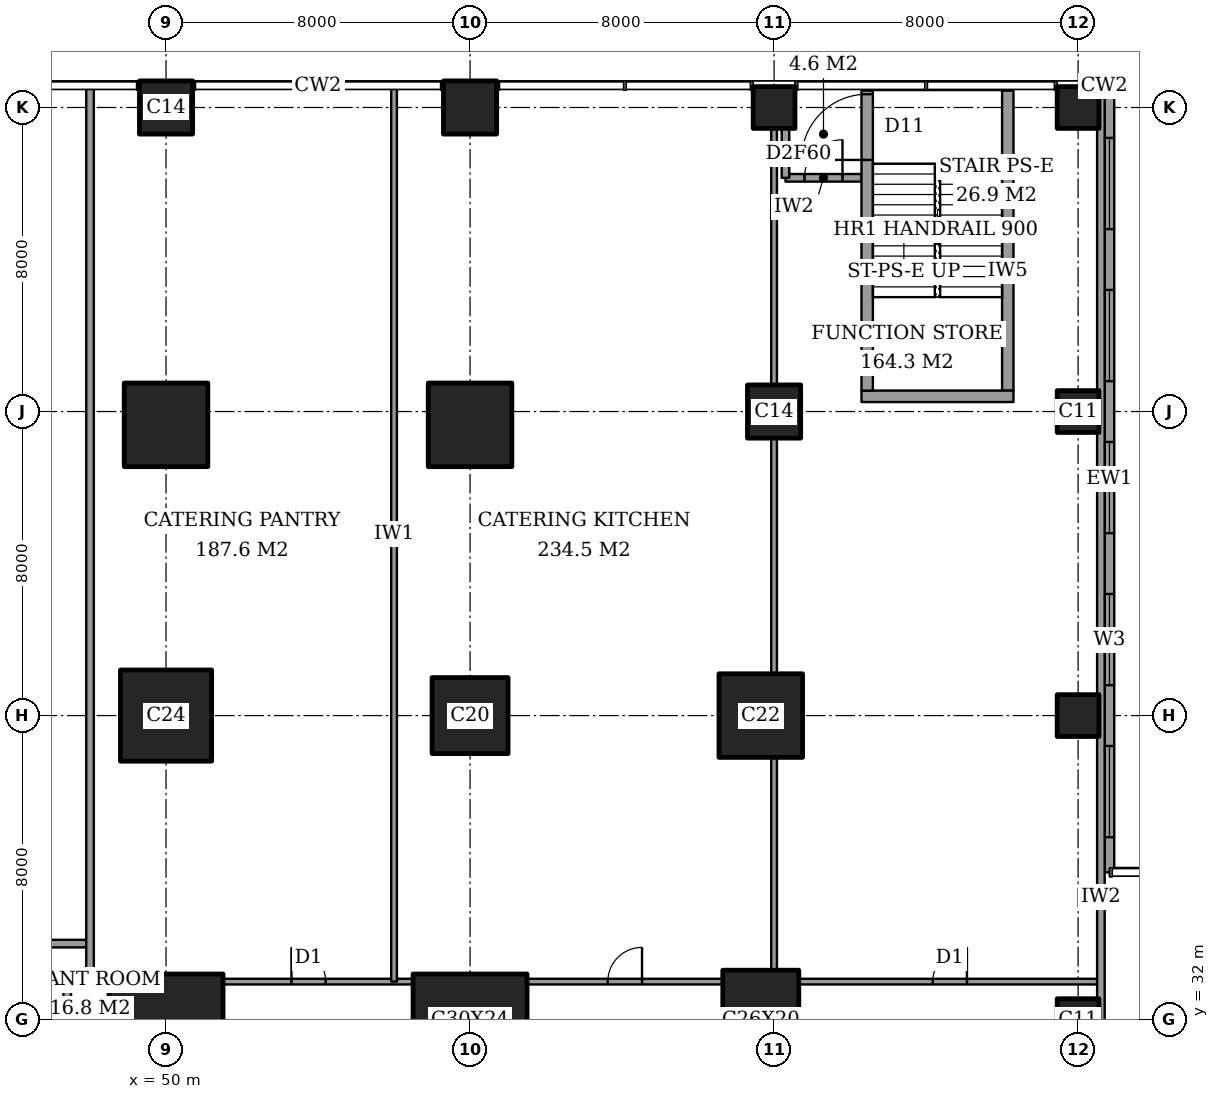
"""IFC4 building model, lengths in metres.
Left out: names, types, materials, properties, quantities, classifications, styles, units other than length and angle.
Written with IfcOpenShell. Run it as: python <this file> out.ifc"""

import sys

from ifc_helpers import new_model, si_unit, direction, frame, frame_2d, origin, origin_2d, place, context, subcontext, project, spatial, rectangle, extrude, element, fill, save


model = new_model("IFC4")
c1 = context("Model", 3, precision=1e-05, world=origin(), true_north=direction((0.0, 1.0)))
c2 = subcontext(c1, "Body", "Model", "MODEL_VIEW")
j1 = project(units=[si_unit("LENGTHUNIT", "METRE"), si_unit("PLANEANGLEUNIT", "RADIAN")], contexts=[c1])
p1 = place(None, origin())
s1 = spatial("IfcSite", under=j1, at=p1, CompositionType="ELEMENT")
p2 = place(p1, origin())
s2 = spatial("IfcBuilding", under=s1, at=p2, CompositionType="ELEMENT")
p3 = place(p2, frame((0.0, 0.0, 6.0)))
s3 = spatial("IfcBuildingStorey", under=s2, at=p3, CompositionType="ELEMENT", Elevation=6.0)
p4 = place(p3, frame((50.0, 32.0, 0.0), z_axis=(0.0, 0.0, 1.0), x_axis=(1.0, 0.0, 0.0)))
e1 = element("IfcColumn", 1, at=p4, inside=s3, PredefinedType="COLUMN", context=c2, shape_type="SweptSolid", body=[
    extrude(rectangle(XDim=3.0, YDim=2.4, at=origin_2d()), origin(), (0.0, 0.0, 1.0), 5.0),
])
p5 = place(p3, frame((50.0, 40.0, 0.0), z_axis=(0.0, 0.0, 1.0), x_axis=(1.0, 0.0, 0.0)))
e2 = element("IfcColumn", 2, at=p5, inside=s3, PredefinedType="COLUMN", context=c2, shape_type="SweptSolid", body=[
    extrude(rectangle(XDim=2.4, YDim=2.4, at=origin_2d()), origin(), (0.0, 0.0, 1.0), 5.0),
])
p6 = place(p3, frame((50.0, 47.65, 0.0), z_axis=(0.0, 0.0, 1.0), x_axis=(1.0, 0.0, 0.0)))
e3 = element("IfcColumn", 3, at=p6, inside=s3, PredefinedType="COLUMN", context=c2, shape_type="SweptSolid", body=[
    extrude(rectangle(XDim=2.2, YDim=2.2, at=origin_2d()), origin(), (0.0, 0.0, 1.0), 5.0),
])
p7 = place(p3, frame((50.0, 56.0, 0.0), z_axis=(0.0, 0.0, 1.0), x_axis=(1.0, 0.0, 0.0)))
e4 = element("IfcColumn", 4, at=p7, inside=s3, PredefinedType="COLUMN", context=c2, shape_type="SweptSolid", body=[
    extrude(rectangle(XDim=1.4, YDim=1.4, at=origin_2d()), origin(), (0.0, 0.0, 1.0), 5.0),
])
p8 = place(p3, frame((58.0, 32.0, 0.0), z_axis=(0.0, 0.0, 1.0), x_axis=(1.0, 0.0, 0.0)))
e5 = element("IfcColumn", 5, at=p8, inside=s3, PredefinedType="COLUMN", context=c2, shape_type="SweptSolid", body=[
    extrude(rectangle(XDim=3.0, YDim=2.4, at=origin_2d()), origin(), (0.0, 0.0, 1.0), 5.0),
])
p9 = place(p3, frame((58.0, 40.0, 0.0), z_axis=(0.0, 0.0, 1.0), x_axis=(1.0, 0.0, 0.0)))
e6 = element("IfcColumn", 6, at=p9, inside=s3, PredefinedType="COLUMN", context=c2, shape_type="SweptSolid", body=[
    extrude(rectangle(XDim=2.0, YDim=2.0, at=origin_2d()), origin(), (0.0, 0.0, 1.0), 5.0),
])
p10 = place(p3, frame((58.0, 47.65, 0.0), z_axis=(0.0, 0.0, 1.0), x_axis=(1.0, 0.0, 0.0)))
e7 = element("IfcColumn", 7, at=p10, inside=s3, PredefinedType="COLUMN", context=c2, shape_type="SweptSolid", body=[
    extrude(rectangle(XDim=2.2, YDim=2.2, at=origin_2d()), origin(), (0.0, 0.0, 1.0), 5.0),
])
p11 = place(p3, frame((58.0, 56.0, 0.0), z_axis=(0.0, 0.0, 1.0), x_axis=(1.0, 0.0, 0.0)))
e8 = element("IfcColumn", 8, at=p11, inside=s3, PredefinedType="COLUMN", context=c2, shape_type="SweptSolid", body=[
    extrude(rectangle(XDim=1.4, YDim=1.4, at=origin_2d()), origin(), (0.0, 0.0, 1.0), 5.0),
])
p12 = place(p3, frame((65.65, 32.0, 0.0), z_axis=(0.0, 0.0, 1.0), x_axis=(0.0, 1.0, 0.0)))
e9 = element("IfcColumn", 9, at=p12, inside=s3, PredefinedType="COLUMN", context=c2, shape_type="SweptSolid", body=[
    extrude(rectangle(XDim=2.6, YDim=2.0, at=origin_2d()), origin(), (0.0, 0.0, 1.0), 5.0),
])
p13 = place(p3, frame((65.65, 40.0, 0.0), z_axis=(0.0, 0.0, 1.0), x_axis=(1.0, 0.0, 0.0)))
e10 = element("IfcColumn", 10, at=p13, inside=s3, PredefinedType="COLUMN", context=c2, shape_type="SweptSolid", body=[
    extrude(rectangle(XDim=2.2, YDim=2.2, at=origin_2d()), origin(), (0.0, 0.0, 1.0), 5.0),
])
p14 = place(p3, frame((66.0, 48.0, 0.0), z_axis=(0.0, 0.0, 1.0), x_axis=(1.0, 0.0, 0.0)))
e11 = element("IfcColumn", 11, at=p14, inside=s3, PredefinedType="COLUMN", context=c2, shape_type="SweptSolid", body=[
    extrude(rectangle(XDim=1.4, YDim=1.4, at=origin_2d()), origin(), (0.0, 0.0, 1.0), 5.0),
])
for number, where, z_axis, x_axis in (
    (12, (66.0, 56.0, 0.0), (0.0, 0.0, 1.0), (1.0, 0.0, 0.0)),
    (13, (74.0, 32.0, 0.0), (0.0, 0.0, 1.0), (1.0, 0.0, 0.0)),
    (14, (74.0, 40.0, 0.0), (0.0, 0.0, 1.0), (1.0, 0.0, 0.0)),
    (15, (74.0, 48.0, 0.0), (0.0, 0.0, 1.0), (1.0, 0.0, 0.0)),
    (16, (74.0, 56.0, 0.0), (0.0, 0.0, 1.0), (1.0, 0.0, 0.0)),
):
    element("IfcColumn", number, at=place(p3, frame(where, z_axis=z_axis, x_axis=x_axis)), inside=s3, PredefinedType="COLUMN", context=c2, shape_type="SweptSolid", body=[
        extrude(rectangle(XDim=1.1, YDim=1.1, at=origin_2d()), origin(), (0.0, 0.0, 1.0), 5.0),
    ])
p15 = place(p3, frame((74.825, 35.875, 0.0), z_axis=(0.0, 0.0, 1.0), x_axis=(0.0, 1.0, 0.0)))
e17 = element("IfcWall", 17, at=p15, inside=s3, PredefinedType="SOLIDWALL", context=c2, shape_type="SweptSolid", body=[
    extrude(rectangle(XDim=20.7, YDim=0.25, at=frame_2d((10.35, 0.0))), origin(), (0.0, 0.0, 1.0), 5.0),
])
p16 = place(p15, frame((4.925, 0.0, 0.6)))
e18 = element("IfcOpeningElement", 18, at=p16, cuts=e17, PredefinedType="OPENING", context=c2, shape_type="SweptSolid", body=[
    extrude(rectangle(XDim=2.4, YDim=3.0, at=frame_2d((1.2, 1.5))), frame((0.0, 0.135, 0.0), z_axis=(0.0, -1.0, 0.0), x_axis=(1.0, 0.0, 0.0)), (0.0, 0.0, 1.0), 0.27),
])
p17 = place(p15, frame((8.925, 0.0, 0.6)))
e19 = element("IfcOpeningElement", 19, at=p17, cuts=e17, PredefinedType="OPENING", context=c2, shape_type="SweptSolid", body=[
    extrude(rectangle(XDim=2.4, YDim=3.0, at=frame_2d((1.2, 1.5))), frame((0.0, 0.135, 0.0), z_axis=(0.0, -1.0, 0.0), x_axis=(1.0, 0.0, 0.0)), (0.0, 0.0, 1.0), 0.27),
])
p18 = place(p15, frame((12.925, 0.0, 0.6)))
e20 = element("IfcOpeningElement", 20, at=p18, cuts=e17, PredefinedType="OPENING", context=c2, shape_type="SweptSolid", body=[
    extrude(rectangle(XDim=2.4, YDim=3.0, at=frame_2d((1.2, 1.5))), frame((0.0, 0.135, 0.0), z_axis=(0.0, -1.0, 0.0), x_axis=(1.0, 0.0, 0.0)), (0.0, 0.0, 1.0), 0.27),
])
p19 = place(p15, frame((16.925, 0.0, 0.6)))
e21 = element("IfcOpeningElement", 21, at=p19, cuts=e17, PredefinedType="OPENING", context=c2, shape_type="SweptSolid", body=[
    extrude(rectangle(XDim=2.4, YDim=3.0, at=frame_2d((1.2, 1.5))), frame((0.0, 0.135, 0.0), z_axis=(0.0, -1.0, 0.0), x_axis=(1.0, 0.0, 0.0)), (0.0, 0.0, 1.0), 0.27),
])
p20 = place(p15, frame((0.925, 0.0, 0.6)))
e22 = element("IfcOpeningElement", 22, at=p20, cuts=e17, PredefinedType="OPENING", context=c2, shape_type="SweptSolid", body=[
    extrude(rectangle(XDim=2.4, YDim=3.0, at=frame_2d((1.2, 1.5))), frame((0.0, 0.135, 0.0), z_axis=(0.0, -1.0, 0.0), x_axis=(1.0, 0.0, 0.0)), (0.0, 0.0, 1.0), 0.27),
])
p21 = place(p3, frame((47.4, 33.0, 0.0), z_axis=(0.0, 0.0, 1.0), x_axis=(1.0, 0.0, 0.0)))
e23 = element("IfcWall", 23, at=p21, inside=s3, PredefinedType="PARTITIONING", context=c2, shape_type="SweptSolid", body=[
    extrude(rectangle(XDim=0.6, YDim=0.2, at=frame_2d((0.3, 0.0))), origin(), (0.0, 0.0, 1.0), 4.7),
])
p22 = place(p3, frame((48.0, 33.0, 0.0), z_axis=(0.0, 0.0, 1.0), x_axis=(1.0, 0.0, 0.0)))
e24 = element("IfcWall", 24, at=p22, inside=s3, PredefinedType="PARTITIONING", context=c2, shape_type="SweptSolid", body=[
    extrude(rectangle(XDim=0.5, YDim=0.15, at=frame_2d((0.25, 0.0))), origin(), (0.0, 0.0, 1.0), 4.7),
])
p23 = place(p3, frame((51.5, 33.0, 0.0), z_axis=(0.0, 0.0, 1.0), x_axis=(1.0, 0.0, 0.0)))
e25 = element("IfcWall", 25, at=p23, inside=s3, PredefinedType="PARTITIONING", context=c2, shape_type="SweptSolid", body=[
    extrude(rectangle(XDim=5.0, YDim=0.15, at=frame_2d((2.5, 0.0))), origin(), (0.0, 0.0, 1.0), 4.7),
])
p24 = place(p23, frame((1.8, 0.0, 0.0)))
e26 = element("IfcOpeningElement", 26, at=p24, cuts=e25, PredefinedType="OPENING", context=c2, shape_type="SweptSolid", body=[
    extrude(rectangle(XDim=0.9, YDim=2.1, at=frame_2d((0.45, 1.05))), frame((0.0, 0.085, 0.0), z_axis=(0.0, -1.0, 0.0), x_axis=(1.0, 0.0, 0.0)), (0.0, 0.0, 1.0), 0.17),
])
p25 = place(p3, frame((59.5, 33.0, 0.0), z_axis=(0.0, 0.0, 1.0), x_axis=(1.0, 0.0, 0.0)))
e27 = element("IfcWall", 27, at=p25, inside=s3, PredefinedType="PARTITIONING", context=c2, shape_type="SweptSolid", body=[
    extrude(rectangle(XDim=5.15, YDim=0.15, at=frame_2d((2.575, 0.0))), origin(), (0.0, 0.0, 1.0), 4.7),
])
p26 = place(p25, frame((2.125, 0.0, 0.0)))
e28 = element("IfcOpeningElement", 28, at=p26, cuts=e27, PredefinedType="OPENING", context=c2, shape_type="SweptSolid", body=[
    extrude(rectangle(XDim=0.9, YDim=2.1, at=frame_2d((0.45, 1.05))), frame((0.0, 0.085, 0.0), z_axis=(0.0, -1.0, 0.0), x_axis=(1.0, 0.0, 0.0)), (0.0, 0.0, 1.0), 0.17),
])
p27 = place(p3, frame((66.65, 33.0, 0.0), z_axis=(0.0, 0.0, 1.0), x_axis=(1.0, 0.0, 0.0)))
e29 = element("IfcWall", 29, at=p27, inside=s3, PredefinedType="PARTITIONING", context=c2, shape_type="SweptSolid", body=[
    extrude(rectangle(XDim=7.95, YDim=0.15, at=frame_2d((3.975, 0.0))), origin(), (0.0, 0.0, 1.0), 4.7),
])
p28 = place(p27, frame((3.525, 0.0, 0.0)))
e30 = element("IfcOpeningElement", 30, at=p28, cuts=e29, PredefinedType="OPENING", context=c2, shape_type="SweptSolid", body=[
    extrude(rectangle(XDim=0.9, YDim=2.1, at=frame_2d((0.45, 1.05))), frame((0.0, 0.085, 0.0), z_axis=(0.0, -1.0, 0.0), x_axis=(1.0, 0.0, 0.0)), (0.0, 0.0, 1.0), 0.17),
])
p29 = place(p3, frame((42.0, 34.0, 0.0), z_axis=(0.0, 0.0, 1.0), x_axis=(1.0, 0.0, 0.0)))
e31 = element("IfcWall", 31, at=p29, inside=s3, PredefinedType="PARTITIONING", context=c2, shape_type="SweptSolid", body=[
    extrude(rectangle(XDim=6.0, YDim=0.2, at=frame_2d((3.0, 0.0))), origin(), (0.0, 0.0, 1.0), 4.7),
])
p30 = place(p3, frame((66.3, 54.15, 0.0), z_axis=(0.0, 0.0, 1.0), x_axis=(1.0, 0.0, 0.0)))
e32 = element("IfcWall", 32, at=p30, inside=s3, PredefinedType="PARTITIONING", context=c2, shape_type="SweptSolid", body=[
    extrude(rectangle(XDim=2.0, YDim=0.2, at=frame_2d((1.0, 0.0))), origin(), (0.0, 0.0, 1.0), 4.7),
])
p31 = place(p30, frame((0.5, 0.0, 0.0)))
e33 = element("IfcOpeningElement", 33, at=p31, cuts=e32, PredefinedType="OPENING", context=c2, shape_type="SweptSolid", body=[
    extrude(rectangle(XDim=1.0, YDim=2.1, at=frame_2d((0.5, 1.05))), frame((0.0, 0.11, 0.0), z_axis=(0.0, -1.0, 0.0), x_axis=(1.0, 0.0, 0.0)), (0.0, 0.0, 1.0), 0.22),
])
p32 = place(p3, frame((47.4, 29.4, 0.0), z_axis=(0.0, 0.0, 1.0), x_axis=(0.0, 1.0, 0.0)))
e34 = element("IfcWall", 34, at=p32, inside=s3, PredefinedType="PARTITIONING", context=c2, shape_type="SweptSolid", body=[
    extrude(rectangle(XDim=3.6, YDim=0.2, at=frame_2d((1.8, 0.0))), origin(), (0.0, 0.0, 1.0), 4.7),
])
p33 = place(p3, frame((48.0, 33.0, 0.0), z_axis=(0.0, 0.0, 1.0), x_axis=(0.0, 1.0, 0.0)))
e35 = element("IfcWall", 35, at=p33, inside=s3, PredefinedType="PARTITIONING", context=c2, shape_type="SweptSolid", body=[
    extrude(rectangle(XDim=23.561, YDim=0.2, at=frame_2d((11.781, 0.0))), origin(), (0.0, 0.0, 1.0), 4.7),
])
p34 = place(p3, frame((56.0, 33.0, 0.0), z_axis=(0.0, 0.0, 1.0), x_axis=(0.0, 1.0, 0.0)))
e36 = element("IfcWall", 36, at=p34, inside=s3, PredefinedType="PARTITIONING", context=c2, shape_type="SweptSolid", body=[
    extrude(rectangle(XDim=23.561, YDim=0.15, at=frame_2d((11.781, 0.0))), origin(), (0.0, 0.0, 1.0), 4.7),
])
p35 = place(p3, frame((66.0, 33.0, 0.0), z_axis=(0.0, 0.0, 1.0), x_axis=(0.0, 1.0, 0.0)))
e37 = element("IfcWall", 37, at=p35, inside=s3, PredefinedType="PARTITIONING", context=c2, shape_type="SweptSolid", body=[
    extrude(rectangle(XDim=5.9, YDim=0.15, at=frame_2d((2.95, 0.0))), origin(), (0.0, 0.0, 1.0), 3.3),
])
p36 = place(p3, frame((66.0, 41.1, 0.0), z_axis=(0.0, 0.0, 1.0), x_axis=(0.0, 1.0, 0.0)))
e38 = element("IfcWall", 38, at=p36, inside=s3, PredefinedType="PARTITIONING", context=c2, shape_type="SweptSolid", body=[
    extrude(rectangle(XDim=6.2, YDim=0.15, at=frame_2d((3.1, 0.0))), origin(), (0.0, 0.0, 1.0), 3.3),
])
p37 = place(p3, frame((66.0, 48.7, 0.0), z_axis=(0.0, 0.0, 1.0), x_axis=(0.0, 1.0, 0.0)))
e39 = element("IfcWall", 39, at=p37, inside=s3, PredefinedType="PARTITIONING", context=c2, shape_type="SweptSolid", body=[
    extrude(rectangle(XDim=6.75, YDim=0.15, at=frame_2d((3.375, 0.0))), origin(), (0.0, 0.0, 1.0), 3.3),
])
p38 = place(p3, frame((66.3, 54.15, 0.0), z_axis=(0.0, 0.0, 1.0), x_axis=(0.0, 1.0, 0.0)))
e40 = element("IfcWall", 40, at=p38, inside=s3, PredefinedType="PARTITIONING", context=c2, shape_type="SweptSolid", body=[
    extrude(rectangle(XDim=1.3, YDim=0.2, at=frame_2d((0.65, 0.0))), origin(), (0.0, 0.0, 1.0), 3.3),
])
p39 = place(p3, frame((74.6, 14.0, 0.0), z_axis=(0.0, 0.0, 1.0), x_axis=(0.0, 1.0, 0.0)))
e41 = element("IfcWall", 41, at=p39, inside=s3, PredefinedType="PARTITIONING", context=c2, shape_type="SweptSolid", body=[
    extrude(rectangle(XDim=42.45, YDim=0.2, at=frame_2d((21.225, 0.0))), origin(), (0.0, 0.0, 1.0), 4.7),
])
p40 = place(p3, frame((68.3, 48.4, 0.0), z_axis=(0.0, 0.0, 1.0), x_axis=(1.0, 0.0, 0.0)))
e42 = element("IfcWall", 42, at=p40, inside=s3, PredefinedType="PARTITIONING", context=c2, shape_type="SweptSolid", body=[
    extrude(rectangle(XDim=4.0, YDim=0.3, at=frame_2d((2.0, 0.0))), origin(), (0.0, 0.0, 1.0), 5.0),
])
p41 = place(p3, frame((68.45, 48.55, 0.0), z_axis=(0.0, 0.0, 1.0), x_axis=(0.0, 1.0, 0.0)))
e43 = element("IfcWall", 43, at=p41, inside=s3, PredefinedType="PARTITIONING", context=c2, shape_type="SweptSolid", body=[
    extrude(rectangle(XDim=7.9, YDim=0.3, at=frame_2d((3.95, 0.0))), origin(), (0.0, 0.0, 1.0), 5.0),
])
p42 = place(p41, frame((6.07, 0.0, 0.0)))
e44 = element("IfcOpeningElement", 44, at=p42, cuts=e43, PredefinedType="OPENING", context=c2, shape_type="SweptSolid", body=[
    extrude(rectangle(XDim=1.73, YDim=2.1, at=frame_2d((0.865, 1.05))), frame((0.0, 0.16, 0.0), z_axis=(0.0, -1.0, 0.0), x_axis=(1.0, 0.0, 0.0)), (0.0, 0.0, 1.0), 0.32),
])
p43 = place(p3, frame((72.15, 48.55, 0.0), z_axis=(0.0, 0.0, 1.0), x_axis=(0.0, 1.0, 0.0)))
e45 = element("IfcWall", 45, at=p43, inside=s3, PredefinedType="PARTITIONING", context=c2, shape_type="SweptSolid", body=[
    extrude(rectangle(XDim=7.9, YDim=0.3, at=frame_2d((3.95, 0.0))), origin(), (0.0, 0.0, 1.0), 5.0),
])
for number, where, z_axis, x_axis in (
    (46, (68.45, 56.45, 0.0), (0.0, 0.0, 1.0), (0.0, 1.0, 0.0)),
    (47, (72.15, 56.45, 0.0), (0.0, 0.0, 1.0), (0.0, 1.0, 0.0)),
):
    element("IfcWall", number, at=place(p3, frame(where, z_axis=z_axis, x_axis=x_axis)), inside=s3, PredefinedType="PARTITIONING", context=c2, shape_type="SweptSolid", body=[
        extrude(rectangle(XDim=0.111, YDim=0.2, at=frame_2d((0.056, 0.0))), origin(), (0.0, 0.0, 1.0), 5.0),
    ])
p44 = place(p16, origin())
e48 = element("IfcWindow", 48, at=p44, inside=s3, PartitioningType="SINGLE_PANEL", PredefinedType="WINDOW", context=c2, shape_type="SweptSolid", body=[
    extrude(rectangle(XDim=2.4, YDim=3.0, at=frame_2d((1.2, 1.5))), frame((0.0, 0.03, 0.0), z_axis=(0.0, -1.0, 0.0), x_axis=(1.0, 0.0, 0.0)), (0.0, 0.0, 1.0), 0.06),
])
fill(e18, e48)
p45 = place(p17, origin())
e49 = element("IfcWindow", 49, at=p45, inside=s3, PartitioningType="SINGLE_PANEL", PredefinedType="WINDOW", context=c2, shape_type="SweptSolid", body=[
    extrude(rectangle(XDim=2.4, YDim=3.0, at=frame_2d((1.2, 1.5))), frame((0.0, 0.03, 0.0), z_axis=(0.0, -1.0, 0.0), x_axis=(1.0, 0.0, 0.0)), (0.0, 0.0, 1.0), 0.06),
])
fill(e19, e49)
p46 = place(p18, origin())
e50 = element("IfcWindow", 50, at=p46, inside=s3, PartitioningType="SINGLE_PANEL", PredefinedType="WINDOW", context=c2, shape_type="SweptSolid", body=[
    extrude(rectangle(XDim=2.4, YDim=3.0, at=frame_2d((1.2, 1.5))), frame((0.0, 0.03, 0.0), z_axis=(0.0, -1.0, 0.0), x_axis=(1.0, 0.0, 0.0)), (0.0, 0.0, 1.0), 0.06),
])
fill(e20, e50)
p47 = place(p19, origin())
e51 = element("IfcWindow", 51, at=p47, inside=s3, PartitioningType="SINGLE_PANEL", PredefinedType="WINDOW", context=c2, shape_type="SweptSolid", body=[
    extrude(rectangle(XDim=2.4, YDim=3.0, at=frame_2d((1.2, 1.5))), frame((0.0, 0.03, 0.0), z_axis=(0.0, -1.0, 0.0), x_axis=(1.0, 0.0, 0.0)), (0.0, 0.0, 1.0), 0.06),
])
fill(e21, e51)
p48 = place(p20, origin())
e52 = element("IfcWindow", 52, at=p48, inside=s3, PartitioningType="SINGLE_PANEL", PredefinedType="WINDOW", context=c2, shape_type="SweptSolid", body=[
    extrude(rectangle(XDim=2.4, YDim=3.0, at=frame_2d((1.2, 1.5))), frame((0.0, 0.03, 0.0), z_axis=(0.0, -1.0, 0.0), x_axis=(1.0, 0.0, 0.0)), (0.0, 0.0, 1.0), 0.06),
])
fill(e22, e52)
p49 = place(p24, origin())
e53 = element("IfcDoor", 53, at=p49, inside=s3, OperationType="SINGLE_SWING_RIGHT", PredefinedType="DOOR", context=c2, shape_type="SweptSolid", body=[
    extrude(rectangle(XDim=0.9, YDim=2.1, at=frame_2d((0.45, 1.05))), frame((0.0, 0.025, 0.0), z_axis=(0.0, -1.0, 0.0), x_axis=(1.0, 0.0, 0.0)), (0.0, 0.0, 1.0), 0.05),
])
fill(e26, e53)
p50 = place(p26, origin())
e54 = element("IfcDoor", 54, at=p50, inside=s3, OperationType="SINGLE_SWING_LEFT", PredefinedType="DOOR", context=c2, shape_type="SweptSolid", body=[
    extrude(rectangle(XDim=0.9, YDim=2.1, at=frame_2d((0.45, 1.05))), frame((0.0, 0.025, 0.0), z_axis=(0.0, -1.0, 0.0), x_axis=(1.0, 0.0, 0.0)), (0.0, 0.0, 1.0), 0.05),
])
fill(e28, e54)
p51 = place(p28, origin())
e55 = element("IfcDoor", 55, at=p51, inside=s3, OperationType="SINGLE_SWING_LEFT", PredefinedType="DOOR", context=c2, shape_type="SweptSolid", body=[
    extrude(rectangle(XDim=0.9, YDim=2.1, at=frame_2d((0.45, 1.05))), frame((0.0, 0.025, 0.0), z_axis=(0.0, -1.0, 0.0), x_axis=(1.0, 0.0, 0.0)), (0.0, 0.0, 1.0), 0.05),
])
fill(e30, e55)
p52 = place(p31, origin())
e56 = element("IfcDoor", 56, at=p52, inside=s3, OperationType="SINGLE_SWING_LEFT", PredefinedType="DOOR", context=c2, shape_type="SweptSolid", body=[
    extrude(rectangle(XDim=1.0, YDim=2.1, at=frame_2d((0.5, 1.05))), frame((0.0, 0.025, 0.0), z_axis=(0.0, -1.0, 0.0), x_axis=(1.0, 0.0, 0.0)), (0.0, 0.0, 1.0), 0.05),
])
fill(e33, e56)
p53 = place(p42, origin())
e57 = element("IfcDoor", 57, at=p53, inside=s3, OperationType="DOUBLE_DOOR_SINGLE_SWING", PredefinedType="DOOR", context=c2, shape_type="SweptSolid", body=[
    extrude(rectangle(XDim=1.73, YDim=2.1, at=frame_2d((0.865, 1.05))), frame((0.0, 0.025, 0.0), z_axis=(0.0, -1.0, 0.0), x_axis=(1.0, 0.0, 0.0)), (0.0, 0.0, 1.0), 0.05),
])
fill(e44, e57)
save(model, sys.argv[1])
